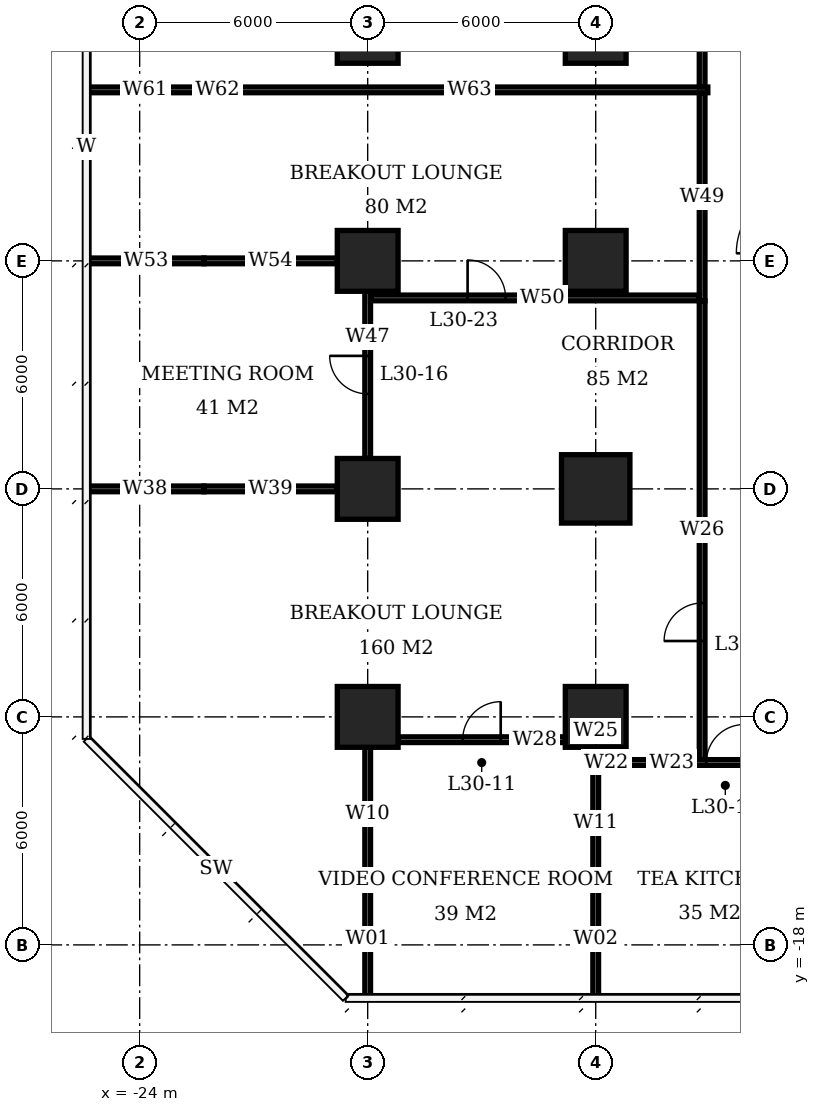
"""IFC4 building model, lengths in metres.
Left out: names, types, materials, properties, quantities, classifications, styles, units other than length and angle.
Written with IfcOpenShell. Run it as: python <this file> out.ifc"""

import sys

from ifc_helpers import new_model, si_unit, direction, frame, frame_2d, origin, origin_2d, place, context, subcontext, project, spatial, rectangle, extrude, element, fill, save


model = new_model("IFC4")
c1 = context("Model", 3, precision=1e-05, world=origin(), true_north=direction((0.0, 1.0)))
c2 = subcontext(c1, "Body", "Model", "MODEL_VIEW")
j1 = project(units=[si_unit("LENGTHUNIT", "METRE"), si_unit("PLANEANGLEUNIT", "RADIAN")], contexts=[c1])
p1 = place(None, origin())
s1 = spatial("IfcSite", under=j1, at=p1, CompositionType="ELEMENT")
p2 = place(p1, origin())
s2 = spatial("IfcBuilding", under=s1, at=p2, CompositionType="ELEMENT")
p3 = place(p2, frame((0.0, 0.0, 125.0)))
s3 = spatial("IfcBuildingStorey", under=s2, at=p3, CompositionType="ELEMENT", Elevation=125.0)
for number, where, z_axis, x_axis in (
    (1, (-18.0, -12.0, 0.0), (0.0, 0.0, 1.0), (1.0, 0.0, 0.0)),
    (2, (-18.0, -6.0, 0.0), (0.0, 0.0, 1.0), (1.0, 0.0, 0.0)),
    (3, (-18.0, 0.0, 0.0), (0.0, 0.0, 1.0), (1.0, 0.0, 0.0)),
    (4, (-18.0, 6.0, 0.0), (0.0, 0.0, 1.0), (1.0, 0.0, 0.0)),
    (5, (-12.0, -12.0, 0.0), (0.0, 0.0, 1.0), (1.0, 0.0, 0.0)),
):
    element("IfcColumn", number, at=place(p3, frame(where, z_axis=z_axis, x_axis=x_axis)), inside=s3, PredefinedType="COLUMN", context=c2, shape_type="SweptSolid", body=[
        extrude(rectangle(XDim=1.6, YDim=1.6, at=origin_2d()), origin(), (0.0, 0.0, 1.0), 3.9),
    ])
p4 = place(p3, frame((-12.0, -6.0, 0.0), z_axis=(0.0, 0.0, 1.0), x_axis=(1.0, 0.0, 0.0)))
e6 = element("IfcColumn", 6, at=p4, inside=s3, PredefinedType="COLUMN", context=c2, shape_type="SweptSolid", body=[
    extrude(rectangle(XDim=1.8, YDim=1.8, at=origin_2d()), origin(), (0.0, 0.0, 1.0), 3.9),
])
for number, where, z_axis, x_axis in (
    (7, (-12.0, 0.0, 0.0), (0.0, 0.0, 1.0), (1.0, 0.0, 0.0)),
    (8, (-12.0, 6.0, 0.0), (0.0, 0.0, 1.0), (1.0, 0.0, 0.0)),
):
    element("IfcColumn", number, at=place(p3, frame(where, z_axis=z_axis, x_axis=x_axis)), inside=s3, PredefinedType="COLUMN", context=c2, shape_type="SweptSolid", body=[
        extrude(rectangle(XDim=1.6, YDim=1.6, at=origin_2d()), origin(), (0.0, 0.0, 1.0), 3.9),
    ])
p5 = place(p3, frame((-12.15, -13.2, 0.0), z_axis=(0.0, 0.0, 1.0), x_axis=(1.0, 0.0, 0.0)))
e9 = element("IfcWall", 9, at=p5, inside=s3, PredefinedType="PARTITIONING", context=c2, shape_type="SweptSolid", body=[
    extrude(rectangle(XDim=0.86, YDim=0.15, at=frame_2d((0.43, 0.0))), origin(), (0.0, 0.0, 1.0), 2.65),
])
p6 = place(p3, frame((-11.29, -13.2, 0.0), z_axis=(0.0, 0.0, 1.0), x_axis=(1.0, 0.0, 0.0)))
e10 = element("IfcWall", 10, at=p6, inside=s3, PredefinedType="PARTITIONING", context=c2, shape_type="SweptSolid", body=[
    extrude(rectangle(XDim=4.58, YDim=0.15, at=frame_2d((2.29, 0.0))), origin(), (0.0, 0.0, 1.0), 3.65),
])
p7 = place(p6, frame((2.2, 0.0, 0.0)))
e11 = element("IfcOpeningElement", 11, at=p7, cuts=e10, PredefinedType="OPENING", context=c2, shape_type="SweptSolid", body=[
    extrude(rectangle(XDim=1.0, YDim=2.1, at=frame_2d((0.5, 1.05))), frame((0.0, 0.085, 0.0), z_axis=(0.0, -1.0, 0.0), x_axis=(1.0, 0.0, 0.0)), (0.0, 0.0, 1.0), 0.17),
])
p8 = place(p3, frame((-17.2, -12.6, 0.0), z_axis=(0.0, 0.0, 1.0), x_axis=(1.0, 0.0, 0.0)))
e12 = element("IfcWall", 12, at=p8, inside=s3, PredefinedType="PARTITIONING", context=c2, shape_type="SweptSolid", body=[
    extrude(rectangle(XDim=4.4, YDim=0.15, at=frame_2d((2.2, 0.0))), origin(), (0.0, 0.0, 1.0), 3.65),
])
p9 = place(p8, frame((1.7, 0.0, 0.0)))
e13 = element("IfcOpeningElement", 13, at=p9, cuts=e12, PredefinedType="OPENING", context=c2, shape_type="SweptSolid", body=[
    extrude(rectangle(XDim=1.0, YDim=2.1, at=frame_2d((0.5, 1.05))), frame((0.0, 0.085, 0.0), z_axis=(0.0, -1.0, 0.0), x_axis=(1.0, 0.0, 0.0)), (0.0, 0.0, 1.0), 0.17),
])
p10 = place(p3, frame((-25.4, -6.0, 0.0), z_axis=(0.0, 0.0, 1.0), x_axis=(1.0, 0.0, 0.0)))
e14 = element("IfcWall", 14, at=p10, inside=s3, PredefinedType="PARTITIONING", context=c2, shape_type="SweptSolid", body=[
    extrude(rectangle(XDim=3.09, YDim=0.15, at=frame_2d((1.545, 0.0))), origin(), (0.0, 0.0, 1.0), 3.65),
])
p11 = place(p3, frame((-22.31, -6.0, 0.0), z_axis=(0.0, 0.0, 1.0), x_axis=(1.0, 0.0, 0.0)))
e15 = element("IfcWall", 15, at=p11, inside=s3, PredefinedType="PARTITIONING", context=c2, shape_type="SweptSolid", body=[
    extrude(rectangle(XDim=3.51, YDim=0.15, at=frame_2d((1.755, 0.0))), origin(), (0.0, 0.0, 1.0), 2.65),
])
p12 = place(p3, frame((-25.35, 0.0, 0.0), z_axis=(0.0, 0.0, 1.0), x_axis=(1.0, 0.0, 0.0)))
e16 = element("IfcWall", 16, at=p12, inside=s3, PredefinedType="PARTITIONING", context=c2, shape_type="SweptSolid", body=[
    extrude(rectangle(XDim=3.04, YDim=0.15, at=frame_2d((1.52, 0.0))), origin(), (0.0, 0.0, 1.0), 3.65),
])
p13 = place(p3, frame((-22.31, 0.0, 0.0), z_axis=(0.0, 0.0, 1.0), x_axis=(1.0, 0.0, 0.0)))
e17 = element("IfcWall", 17, at=p13, inside=s3, PredefinedType="PARTITIONING", context=c2, shape_type="SweptSolid", body=[
    extrude(rectangle(XDim=3.51, YDim=0.15, at=frame_2d((1.755, 0.0))), origin(), (0.0, 0.0, 1.0), 2.65),
])
p14 = place(p3, frame((-18.0, -19.4, 0.0), z_axis=(0.0, 0.0, 1.0), x_axis=(0.0, 1.0, 0.0)))
e18 = element("IfcWall", 18, at=p14, inside=s3, PredefinedType="PARTITIONING", context=c2, shape_type="SweptSolid", body=[
    extrude(rectangle(XDim=3.09, YDim=0.15, at=frame_2d((1.545, 0.0))), origin(), (0.0, 0.0, 1.0), 3.65),
])
p15 = place(p3, frame((-18.0, -16.31, 0.0), z_axis=(0.0, 0.0, 1.0), x_axis=(0.0, 1.0, 0.0)))
e19 = element("IfcWall", 19, at=p15, inside=s3, PredefinedType="PARTITIONING", context=c2, shape_type="SweptSolid", body=[
    extrude(rectangle(XDim=3.51, YDim=0.15, at=frame_2d((1.755, 0.0))), origin(), (0.0, 0.0, 1.0), 2.65),
])
p16 = place(p3, frame((-18.0, -5.2, 0.0), z_axis=(0.0, 0.0, 1.0), x_axis=(0.0, 1.0, 0.0)))
e20 = element("IfcWall", 20, at=p16, inside=s3, PredefinedType="PARTITIONING", context=c2, shape_type="SweptSolid", body=[
    extrude(rectangle(XDim=4.4, YDim=0.15, at=frame_2d((2.2, 0.0))), origin(), (0.0, 0.0, 1.0), 3.65),
])
p17 = place(p16, frame((1.7, 0.0, 0.0)))
e21 = element("IfcOpeningElement", 21, at=p17, cuts=e20, PredefinedType="OPENING", context=c2, shape_type="SweptSolid", body=[
    extrude(rectangle(XDim=1.0, YDim=2.1, at=frame_2d((0.5, 1.05))), frame((0.0, 0.085, 0.0), z_axis=(0.0, -1.0, 0.0), x_axis=(1.0, 0.0, 0.0)), (0.0, 0.0, 1.0), 0.17),
])
p18 = place(p3, frame((-12.0, -19.4, 0.0), z_axis=(0.0, 0.0, 1.0), x_axis=(0.0, 1.0, 0.0)))
e22 = element("IfcWall", 22, at=p18, inside=s3, PredefinedType="PARTITIONING", context=c2, shape_type="SweptSolid", body=[
    extrude(rectangle(XDim=3.09, YDim=0.15, at=frame_2d((1.545, 0.0))), origin(), (0.0, 0.0, 1.0), 3.65),
])
p19 = place(p3, frame((-12.0, -16.31, 0.0), z_axis=(0.0, 0.0, 1.0), x_axis=(0.0, 1.0, 0.0)))
e23 = element("IfcWall", 23, at=p19, inside=s3, PredefinedType="PARTITIONING", context=c2, shape_type="SweptSolid", body=[
    extrude(rectangle(XDim=3.035, YDim=0.15, at=frame_2d((1.518, 0.0))), origin(), (0.0, 0.0, 1.0), 2.65),
])
p20 = place(p3, frame((-12.0, -13.125, 0.0), z_axis=(0.0, 0.0, 1.0), x_axis=(0.0, 1.0, 0.0)))
e24 = element("IfcWall", 24, at=p20, inside=s3, PredefinedType="PARTITIONING", context=c2, shape_type="SweptSolid", body=[
    extrude(rectangle(XDim=0.325, YDim=0.15, at=frame_2d((0.163, 0.0))), origin(), (0.0, 0.0, 1.0), 2.65),
])
p21 = place(p3, frame((-25.4, 4.5, 0.0), z_axis=(0.0, 0.0, 1.0), x_axis=(1.0, 0.0, 0.0)))
e25 = element("IfcWall", 25, at=p21, inside=s3, PredefinedType="PARTITIONING", context=c2, shape_type="SweptSolid", body=[
    extrude(rectangle(XDim=3.09, YDim=0.15, at=frame_2d((1.545, 0.0))), origin(), (0.0, 0.0, 1.0), 3.65),
])
p22 = place(p3, frame((-22.31, 4.5, 0.0), z_axis=(0.0, 0.0, 1.0), x_axis=(1.0, 0.0, 0.0)))
e26 = element("IfcWall", 26, at=p22, inside=s3, PredefinedType="PARTITIONING", context=c2, shape_type="SweptSolid", body=[
    extrude(rectangle(XDim=0.72, YDim=0.15, at=frame_2d((0.36, 0.0))), origin(), (0.0, 0.0, 1.0), 2.65),
])
p23 = place(p3, frame((-21.59, 4.5, 0.0), z_axis=(0.0, 0.0, 1.0), x_axis=(1.0, 0.0, 0.0)))
e27 = element("IfcWall", 27, at=p23, inside=s3, PredefinedType="PARTITIONING", context=c2, shape_type="SweptSolid", body=[
    extrude(rectangle(XDim=12.54, YDim=0.15, at=frame_2d((6.27, 0.0))), origin(), (0.0, 0.0, 1.0), 3.65),
])
p24 = place(p3, frame((-17.925, -0.975, 0.0), z_axis=(0.0, 0.0, 1.0), x_axis=(1.0, 0.0, 0.0)))
e28 = element("IfcWall", 28, at=p24, inside=s3, PredefinedType="PARTITIONING", context=c2, shape_type="SweptSolid", body=[
    extrude(rectangle(XDim=8.65, YDim=0.15, at=frame_2d((4.325, 0.0))), origin(), (0.0, 0.0, 1.0), 3.65),
])
p25 = place(p24, frame((2.554, 0.0, 0.0)))
e29 = element("IfcOpeningElement", 29, at=p25, cuts=e28, PredefinedType="OPENING", context=c2, shape_type="SweptSolid", body=[
    extrude(rectangle(XDim=1.0, YDim=2.1, at=frame_2d((0.5, 1.05))), frame((0.0, 0.085, 0.0), z_axis=(0.0, -1.0, 0.0), x_axis=(1.0, 0.0, 0.0)), (0.0, 0.0, 1.0), 0.17),
])
p26 = place(p3, frame((-9.2, -13.125, 0.0), z_axis=(0.0, 0.0, 1.0), x_axis=(0.0, 1.0, 0.0)))
e30 = element("IfcWall", 30, at=p26, inside=s3, PredefinedType="PARTITIONING", context=c2, shape_type="SweptSolid", body=[
    extrude(rectangle(XDim=12.075, YDim=0.15, at=frame_2d((6.038, 0.0))), origin(), (0.0, 0.0, 1.0), 3.65),
])
p27 = place(p26, frame((3.122, 0.0, 0.0)))
e31 = element("IfcOpeningElement", 31, at=p27, cuts=e30, PredefinedType="OPENING", context=c2, shape_type="SweptSolid", body=[
    extrude(rectangle(XDim=1.0, YDim=2.1, at=frame_2d((0.5, 1.05))), frame((0.0, 0.085, 0.0), z_axis=(0.0, -1.0, 0.0), x_axis=(1.0, 0.0, 0.0)), (0.0, 0.0, 1.0), 0.17),
])
p28 = place(p3, frame((-9.2, -1.05, 0.0), z_axis=(0.0, 0.0, 1.0), x_axis=(0.0, 1.0, 0.0)))
e32 = element("IfcWall", 32, at=p28, inside=s3, PredefinedType="PARTITIONING", context=c2, shape_type="SweptSolid", body=[
    extrude(rectangle(XDim=5.475, YDim=0.15, at=frame_2d((2.738, 0.0))), origin(), (0.0, 0.0, 1.0), 3.65),
])
p29 = place(p3, frame((-9.2, 4.575, 0.0), z_axis=(0.0, 0.0, 1.0), x_axis=(0.0, 1.0, 0.0)))
e33 = element("IfcWall", 33, at=p29, inside=s3, PredefinedType="PARTITIONING", context=c2, shape_type="SweptSolid", body=[
    extrude(rectangle(XDim=8.85, YDim=0.15, at=frame_2d((4.425, 0.0))), origin(), (0.0, 0.0, 1.0), 3.65),
])
p30 = place(p29, frame((2.575, 0.0, 0.0)))
e34 = element("IfcOpeningElement", 34, at=p30, cuts=e33, PredefinedType="OPENING", context=c2, shape_type="SweptSolid", body=[
    extrude(rectangle(XDim=1.0, YDim=2.1, at=frame_2d((0.5, 1.05))), frame((0.0, 0.085, 0.0), z_axis=(0.0, -1.0, 0.0), x_axis=(1.0, 0.0, 0.0)), (0.0, 0.0, 1.0), 0.17),
])
p31 = place(p9, origin())
e35 = element("IfcDoor", 35, at=p31, inside=s3, OperationType="SINGLE_SWING_RIGHT", PredefinedType="DOOR", context=c2, shape_type="SweptSolid", body=[
    extrude(rectangle(XDim=1.0, YDim=2.1, at=frame_2d((0.5, 1.05))), frame((0.0, 0.025, 0.0), z_axis=(0.0, -1.0, 0.0), x_axis=(1.0, 0.0, 0.0)), (0.0, 0.0, 1.0), 0.05),
])
fill(e13, e35)
p32 = place(p7, origin())
e36 = element("IfcDoor", 36, at=p32, inside=s3, OperationType="SINGLE_SWING_RIGHT", PredefinedType="DOOR", context=c2, shape_type="SweptSolid", body=[
    extrude(rectangle(XDim=1.0, YDim=2.1, at=frame_2d((0.5, 1.05))), frame((0.0, 0.025, 0.0), z_axis=(0.0, -1.0, 0.0), x_axis=(1.0, 0.0, 0.0)), (0.0, 0.0, 1.0), 0.05),
])
fill(e11, e36)
p33 = place(p17, origin())
e37 = element("IfcDoor", 37, at=p33, inside=s3, OperationType="SINGLE_SWING_RIGHT", PredefinedType="DOOR", context=c2, shape_type="SweptSolid", body=[
    extrude(rectangle(XDim=1.0, YDim=2.1, at=frame_2d((0.5, 1.05))), frame((0.0, 0.025, 0.0), z_axis=(0.0, -1.0, 0.0), x_axis=(1.0, 0.0, 0.0)), (0.0, 0.0, 1.0), 0.05),
])
fill(e21, e37)
p34 = place(p27, origin())
e38 = element("IfcDoor", 38, at=p34, inside=s3, OperationType="SINGLE_SWING_LEFT", PredefinedType="DOOR", context=c2, shape_type="SweptSolid", body=[
    extrude(rectangle(XDim=1.0, YDim=2.1, at=frame_2d((0.5, 1.05))), frame((0.0, 0.025, 0.0), z_axis=(0.0, -1.0, 0.0), x_axis=(1.0, 0.0, 0.0)), (0.0, 0.0, 1.0), 0.05),
])
fill(e31, e38)
p35 = place(p25, origin())
e39 = element("IfcDoor", 39, at=p35, inside=s3, OperationType="SINGLE_SWING_LEFT", PredefinedType="DOOR", context=c2, shape_type="SweptSolid", body=[
    extrude(rectangle(XDim=1.0, YDim=2.1, at=frame_2d((0.5, 1.05))), frame((0.0, 0.025, 0.0), z_axis=(0.0, -1.0, 0.0), x_axis=(1.0, 0.0, 0.0)), (0.0, 0.0, 1.0), 0.05),
])
fill(e29, e39)
save(model, sys.argv[1])
